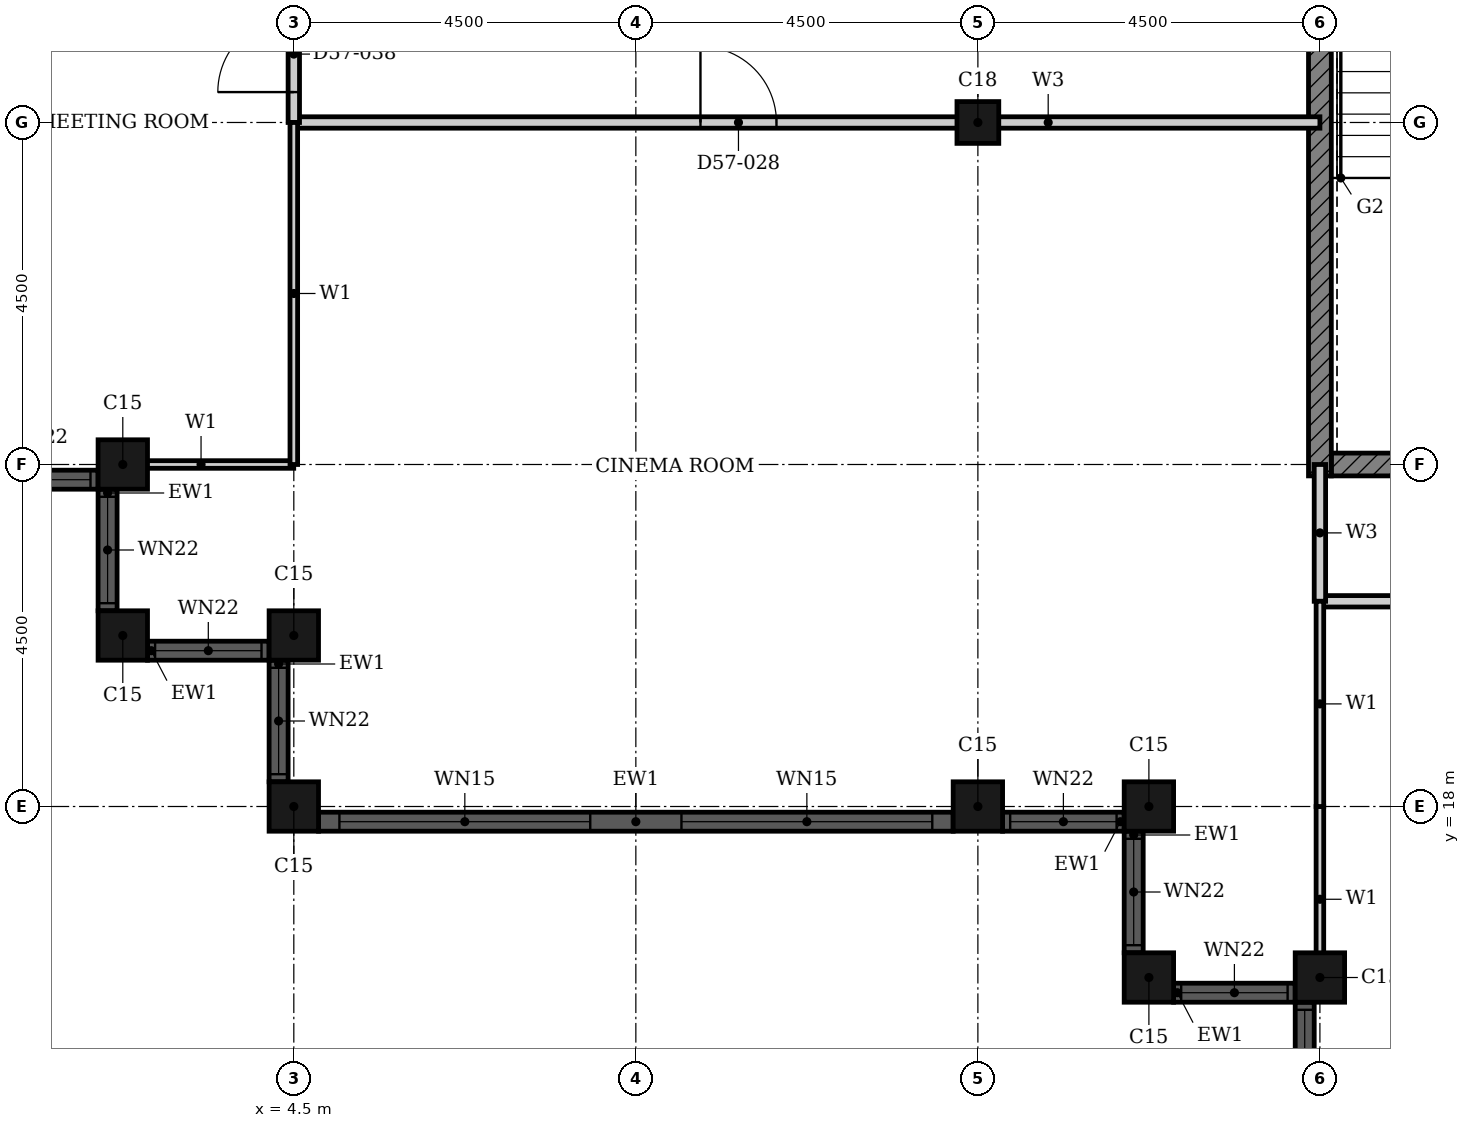
"""IFC4 building model, lengths in metres.
Left out: names, types, materials, properties, quantities, classifications, styles, units other than length and angle.
Written with IfcOpenShell. Run it as: python <this file> out.ifc"""

import sys

from ifc_helpers import new_model, si_unit, direction, frame, frame_2d, origin, origin_2d, place, context, subcontext, project, spatial, rectangle, hollow_rectangle, extrude, element, fill, save


model = new_model("IFC4")
c1 = context("Model", 3, precision=1e-05, world=origin(), true_north=direction((0.0, 1.0)))
c2 = subcontext(c1, "Body", "Model", "MODEL_VIEW")
j1 = project(units=[si_unit("LENGTHUNIT", "METRE"), si_unit("PLANEANGLEUNIT", "RADIAN")], contexts=[c1])
p1 = place(None, origin())
s1 = spatial("IfcSite", under=j1, at=p1, CompositionType="ELEMENT")
p2 = place(p1, origin())
s2 = spatial("IfcBuilding", under=s1, at=p2, CompositionType="ELEMENT")
p3 = place(p2, frame((0.0, 0.0, 225.7)))
s3 = spatial("IfcBuildingStorey", under=s2, at=p3, CompositionType="ELEMENT", Elevation=225.7)
for number, where, z_axis, x_axis in (
    (1, (2.25, 22.5, 0.0), (0.0, 0.0, 1.0), (1.0, 0.0, 0.0)),
    (2, (2.25, 20.25, 0.0), (0.0, 0.0, 1.0), (1.0, 0.0, 0.0)),
    (3, (4.5, 20.25, 0.0), (0.0, 0.0, 1.0), (1.0, 0.0, 0.0)),
    (4, (4.5, 18.0, 0.0), (0.0, 0.0, 1.0), (1.0, 0.0, 0.0)),
    (5, (13.5, 18.0, 0.0), (0.0, 0.0, 1.0), (1.0, 0.0, 0.0)),
    (6, (15.75, 18.0, 0.0), (0.0, 0.0, 1.0), (1.0, 0.0, 0.0)),
    (7, (15.75, 15.75, 0.0), (0.0, 0.0, 1.0), (1.0, 0.0, 0.0)),
    (8, (18.0, 15.75, 0.0), (0.0, 0.0, 1.0), (1.0, 0.0, 0.0)),
):
    element("IfcColumn", number, at=place(p3, frame(where, z_axis=z_axis, x_axis=x_axis)), inside=s3, PredefinedType="COLUMN", context=c2, shape_type="SweptSolid", body=[
        extrude(hollow_rectangle(XDim=0.65, YDim=0.65, WallThickness=0.021, at=origin_2d()), origin(), (0.0, 0.0, 1.0), 3.7),
    ])
p4 = place(p3, frame((13.5, 27.0, 0.0), z_axis=(0.0, 0.0, 1.0), x_axis=(1.0, 0.0, 0.0)))
e9 = element("IfcColumn", 9, at=p4, inside=s3, PredefinedType="COLUMN", context=c2, shape_type="SweptSolid", body=[
    extrude(hollow_rectangle(XDim=0.55, YDim=0.55, WallThickness=0.018, at=origin_2d()), origin(), (0.0, 0.0, 1.0), 3.7),
])
p5 = place(p3, frame((0.325, 22.3, 0.0), z_axis=(0.0, 0.0, 1.0), x_axis=(1.0, 0.0, 0.0)))
e10 = element("IfcWall", 10, at=p5, inside=s3, PredefinedType="SOLIDWALL", context=c2, shape_type="SweptSolid", body=[
    extrude(rectangle(XDim=1.6, YDim=0.25, at=frame_2d((0.8, 0.0))), origin(), (0.0, 0.0, 1.0), 3.7),
])
p6 = place(p5, frame((0.1, 0.0, 0.9)))
e11 = element("IfcOpeningElement", 11, at=p6, cuts=e10, PredefinedType="OPENING", context=c2, shape_type="SweptSolid", body=[
    extrude(rectangle(XDim=1.4, YDim=1.85, at=frame_2d((0.7, 0.925))), frame((0.0, 0.135, 0.0), z_axis=(0.0, -1.0, 0.0), x_axis=(1.0, 0.0, 0.0)), (0.0, 0.0, 1.0), 0.27),
])
p7 = place(p3, frame((2.05, 22.175, 0.0), z_axis=(0.0, 0.0, 1.0), x_axis=(0.0, -1.0, 0.0)))
e12 = element("IfcWall", 12, at=p7, inside=s3, PredefinedType="SOLIDWALL", context=c2, shape_type="SweptSolid", body=[
    extrude(rectangle(XDim=1.6, YDim=0.25, at=frame_2d((0.8, 0.0))), origin(), (0.0, 0.0, 1.0), 3.7),
])
p8 = place(p7, frame((0.1, 0.0, 0.9)))
e13 = element("IfcOpeningElement", 13, at=p8, cuts=e12, PredefinedType="OPENING", context=c2, shape_type="SweptSolid", body=[
    extrude(rectangle(XDim=1.4, YDim=1.85, at=frame_2d((0.7, 0.925))), frame((0.0, 0.135, 0.0), z_axis=(0.0, -1.0, 0.0), x_axis=(1.0, 0.0, 0.0)), (0.0, 0.0, 1.0), 0.27),
])
p9 = place(p3, frame((2.575, 20.05, 0.0), z_axis=(0.0, 0.0, 1.0), x_axis=(1.0, 0.0, 0.0)))
e14 = element("IfcWall", 14, at=p9, inside=s3, PredefinedType="SOLIDWALL", context=c2, shape_type="SweptSolid", body=[
    extrude(rectangle(XDim=1.6, YDim=0.25, at=frame_2d((0.8, 0.0))), origin(), (0.0, 0.0, 1.0), 3.7),
])
p10 = place(p9, frame((0.1, 0.0, 0.9)))
e15 = element("IfcOpeningElement", 15, at=p10, cuts=e14, PredefinedType="OPENING", context=c2, shape_type="SweptSolid", body=[
    extrude(rectangle(XDim=1.4, YDim=1.85, at=frame_2d((0.7, 0.925))), frame((0.0, 0.135, 0.0), z_axis=(0.0, -1.0, 0.0), x_axis=(1.0, 0.0, 0.0)), (0.0, 0.0, 1.0), 0.27),
])
p11 = place(p3, frame((4.3, 19.925, 0.0), z_axis=(0.0, 0.0, 1.0), x_axis=(0.0, -1.0, 0.0)))
e16 = element("IfcWall", 16, at=p11, inside=s3, PredefinedType="SOLIDWALL", context=c2, shape_type="SweptSolid", body=[
    extrude(rectangle(XDim=1.6, YDim=0.25, at=frame_2d((0.8, 0.0))), origin(), (0.0, 0.0, 1.0), 3.7),
])
p12 = place(p11, frame((0.1, 0.0, 0.9)))
e17 = element("IfcOpeningElement", 17, at=p12, cuts=e16, PredefinedType="OPENING", context=c2, shape_type="SweptSolid", body=[
    extrude(rectangle(XDim=1.4, YDim=1.85, at=frame_2d((0.7, 0.925))), frame((0.0, 0.135, 0.0), z_axis=(0.0, -1.0, 0.0), x_axis=(1.0, 0.0, 0.0)), (0.0, 0.0, 1.0), 0.27),
])
p13 = place(p3, frame((4.825, 17.8, 0.0), z_axis=(0.0, 0.0, 1.0), x_axis=(1.0, 0.0, 0.0)))
e18 = element("IfcWall", 18, at=p13, inside=s3, PredefinedType="SOLIDWALL", context=c2, shape_type="SweptSolid", body=[
    extrude(rectangle(XDim=8.35, YDim=0.25, at=frame_2d((4.175, 0.0))), origin(), (0.0, 0.0, 1.0), 3.7),
])
p14 = place(p13, frame((0.275, 0.0, 0.45)))
e19 = element("IfcOpeningElement", 19, at=p14, cuts=e18, PredefinedType="OPENING", context=c2, shape_type="SweptSolid", body=[
    extrude(rectangle(XDim=3.3, YDim=2.3, at=frame_2d((1.65, 1.15))), frame((0.0, 0.135, 0.0), z_axis=(0.0, -1.0, 0.0), x_axis=(1.0, 0.0, 0.0)), (0.0, 0.0, 1.0), 0.27),
])
p15 = place(p13, frame((4.775, 0.0, 0.45)))
e20 = element("IfcOpeningElement", 20, at=p15, cuts=e18, PredefinedType="OPENING", context=c2, shape_type="SweptSolid", body=[
    extrude(rectangle(XDim=3.3, YDim=2.3, at=frame_2d((1.65, 1.15))), frame((0.0, 0.135, 0.0), z_axis=(0.0, -1.0, 0.0), x_axis=(1.0, 0.0, 0.0)), (0.0, 0.0, 1.0), 0.27),
])
p16 = place(p3, frame((13.825, 17.8, 0.0), z_axis=(0.0, 0.0, 1.0), x_axis=(1.0, 0.0, 0.0)))
e21 = element("IfcWall", 21, at=p16, inside=s3, PredefinedType="SOLIDWALL", context=c2, shape_type="SweptSolid", body=[
    extrude(rectangle(XDim=1.6, YDim=0.25, at=frame_2d((0.8, 0.0))), origin(), (0.0, 0.0, 1.0), 3.7),
])
p17 = place(p16, frame((0.1, 0.0, 0.9)))
e22 = element("IfcOpeningElement", 22, at=p17, cuts=e21, PredefinedType="OPENING", context=c2, shape_type="SweptSolid", body=[
    extrude(rectangle(XDim=1.4, YDim=1.85, at=frame_2d((0.7, 0.925))), frame((0.0, 0.135, 0.0), z_axis=(0.0, -1.0, 0.0), x_axis=(1.0, 0.0, 0.0)), (0.0, 0.0, 1.0), 0.27),
])
p18 = place(p3, frame((15.55, 17.675, 0.0), z_axis=(0.0, 0.0, 1.0), x_axis=(0.0, -1.0, 0.0)))
e23 = element("IfcWall", 23, at=p18, inside=s3, PredefinedType="SOLIDWALL", context=c2, shape_type="SweptSolid", body=[
    extrude(rectangle(XDim=1.6, YDim=0.25, at=frame_2d((0.8, 0.0))), origin(), (0.0, 0.0, 1.0), 3.7),
])
p19 = place(p18, frame((0.1, 0.0, 0.9)))
e24 = element("IfcOpeningElement", 24, at=p19, cuts=e23, PredefinedType="OPENING", context=c2, shape_type="SweptSolid", body=[
    extrude(rectangle(XDim=1.4, YDim=1.85, at=frame_2d((0.7, 0.925))), frame((0.0, 0.135, 0.0), z_axis=(0.0, -1.0, 0.0), x_axis=(1.0, 0.0, 0.0)), (0.0, 0.0, 1.0), 0.27),
])
p20 = place(p3, frame((16.075, 15.55, 0.0), z_axis=(0.0, 0.0, 1.0), x_axis=(1.0, 0.0, 0.0)))
e25 = element("IfcWall", 25, at=p20, inside=s3, PredefinedType="SOLIDWALL", context=c2, shape_type="SweptSolid", body=[
    extrude(rectangle(XDim=1.6, YDim=0.25, at=frame_2d((0.8, 0.0))), origin(), (0.0, 0.0, 1.0), 3.7),
])
p21 = place(p20, frame((0.1, 0.0, 0.9)))
e26 = element("IfcOpeningElement", 26, at=p21, cuts=e25, PredefinedType="OPENING", context=c2, shape_type="SweptSolid", body=[
    extrude(rectangle(XDim=1.4, YDim=1.85, at=frame_2d((0.7, 0.925))), frame((0.0, 0.135, 0.0), z_axis=(0.0, -1.0, 0.0), x_axis=(1.0, 0.0, 0.0)), (0.0, 0.0, 1.0), 0.27),
])
p22 = place(p3, frame((17.8, 15.425, 0.0), z_axis=(0.0, 0.0, 1.0), x_axis=(0.0, -1.0, 0.0)))
e27 = element("IfcWall", 27, at=p22, inside=s3, PredefinedType="SOLIDWALL", context=c2, shape_type="SweptSolid", body=[
    extrude(rectangle(XDim=1.6, YDim=0.25, at=frame_2d((0.8, 0.0))), origin(), (0.0, 0.0, 1.0), 3.7),
])
p23 = place(p22, frame((0.1, 0.0, 0.9)))
e28 = element("IfcOpeningElement", 28, at=p23, cuts=e27, PredefinedType="OPENING", context=c2, shape_type="SweptSolid", body=[
    extrude(rectangle(XDim=1.4, YDim=1.85, at=frame_2d((0.7, 0.925))), frame((0.0, 0.135, 0.0), z_axis=(0.0, -1.0, 0.0), x_axis=(1.0, 0.0, 0.0)), (0.0, 0.0, 1.0), 0.27),
])
p24 = place(p3, frame((18.15, 22.5, 0.0), z_axis=(0.0, 0.0, 1.0), x_axis=(1.0, 0.0, 0.0)))
e29 = element("IfcWall", 29, at=p24, inside=s3, PredefinedType="SHEAR", context=c2, shape_type="SweptSolid", body=[
    extrude(rectangle(XDim=4.225, YDim=0.3, at=frame_2d((2.113, 0.0))), origin(), (0.0, 0.0, 1.0), 3.4),
])
p25 = place(p3, frame((18.0, 22.35, 0.0), z_axis=(0.0, 0.0, 1.0), x_axis=(0.0, 1.0, 0.0)))
e30 = element("IfcWall", 30, at=p25, inside=s3, PredefinedType="SHEAR", context=c2, shape_type="SweptSolid", body=[
    extrude(rectangle(XDim=9.3, YDim=0.3, at=frame_2d((4.65, 0.0))), origin(), (0.0, 0.0, 1.0), 3.4),
])
p26 = place(p3, frame((18.0, 20.7, 0.0), z_axis=(0.0, 0.0, 1.0), x_axis=(1.0, 0.0, 0.0)))
e31 = element("IfcWall", 31, at=p26, inside=s3, PredefinedType="PARTITIONING", context=c2, shape_type="SweptSolid", body=[
    extrude(rectangle(XDim=13.5, YDim=0.15, at=frame_2d((6.75, 0.0))), origin(), (0.0, 0.0, 1.0), 3.4),
])
p27 = place(p26, frame((6.25, 0.0, 0.0)))
e32 = element("IfcOpeningElement", 32, at=p27, cuts=e31, PredefinedType="OPENING", context=c2, shape_type="SweptSolid", body=[
    extrude(rectangle(XDim=1.0, YDim=2.1, at=frame_2d((0.5, 1.05))), frame((0.0, 0.085, 0.0), z_axis=(0.0, -1.0, 0.0), x_axis=(1.0, 0.0, 0.0)), (0.0, 0.0, 1.0), 0.17),
])
p28 = place(p3, frame((4.5, 27.0, 0.0), z_axis=(0.0, 0.0, 1.0), x_axis=(1.0, 0.0, 0.0)))
e33 = element("IfcWall", 33, at=p28, inside=s3, PredefinedType="PARTITIONING", context=c2, shape_type="SweptSolid", body=[
    extrude(rectangle(XDim=13.5, YDim=0.15, at=frame_2d((6.75, 0.0))), origin(), (0.0, 0.0, 1.0), 2.68),
])
p29 = place(p28, frame((5.35, 0.0, 0.0)))
e34 = element("IfcOpeningElement", 34, at=p29, cuts=e33, PredefinedType="OPENING", context=c2, shape_type="SweptSolid", body=[
    extrude(rectangle(XDim=1.0, YDim=2.1, at=frame_2d((0.5, 1.05))), frame((0.0, 0.085, 0.0), z_axis=(0.0, -1.0, 0.0), x_axis=(1.0, 0.0, 0.0)), (0.0, 0.0, 1.0), 0.17),
])
p30 = place(p3, frame((18.0, 20.7, 0.0), z_axis=(0.0, 0.0, 1.0), x_axis=(0.0, 1.0, 0.0)))
e35 = element("IfcWall", 35, at=p30, inside=s3, PredefinedType="PARTITIONING", context=c2, shape_type="SweptSolid", body=[
    extrude(rectangle(XDim=1.8, YDim=0.15, at=frame_2d((0.9, 0.0))), origin(), (0.0, 0.0, 1.0), 3.4),
])
p31 = place(p3, frame((4.5, 27.0, 0.0), z_axis=(0.0, 0.0, 1.0), x_axis=(0.0, 1.0, 0.0)))
e36 = element("IfcWall", 36, at=p31, inside=s3, PredefinedType="PARTITIONING", context=c2, shape_type="SweptSolid", body=[
    extrude(rectangle(XDim=1.8, YDim=0.15, at=frame_2d((0.9, 0.0))), origin(), (0.0, 0.0, 1.0), 3.4),
])
p32 = place(p31, frame((0.4, 0.0, 0.0)))
e37 = element("IfcOpeningElement", 37, at=p32, cuts=e36, PredefinedType="OPENING", context=c2, shape_type="SweptSolid", body=[
    extrude(rectangle(XDim=1.0, YDim=2.1, at=frame_2d((0.5, 1.05))), frame((0.0, 0.085, 0.0), z_axis=(0.0, -1.0, 0.0), x_axis=(1.0, 0.0, 0.0)), (0.0, 0.0, 1.0), 0.17),
])
p33 = place(p3, frame((2.06, 22.5, 0.0), z_axis=(0.0, 0.0, 1.0), x_axis=(1.0, 0.0, 0.0)))
e38 = element("IfcWall", 38, at=p33, inside=s3, PredefinedType="PARTITIONING", context=c2, shape_type="SweptSolid", body=[
    extrude(rectangle(XDim=2.439, YDim=0.1, at=frame_2d((1.219, 0.0))), origin(), (0.0, 0.0, 1.0), 2.68),
])
p34 = place(p3, frame((18.0, 15.56, 0.0), z_axis=(0.0, 0.0, 1.0), x_axis=(0.0, 1.0, 0.0)))
e39 = element("IfcWall", 39, at=p34, inside=s3, PredefinedType="PARTITIONING", context=c2, shape_type="SweptSolid", body=[
    extrude(rectangle(XDim=2.439, YDim=0.1, at=frame_2d((1.219, 0.0))), origin(), (0.0, 0.0, 1.0), 3.4),
])
p35 = place(p3, frame((18.0, 18.0, 0.0), z_axis=(0.0, 0.0, 1.0), x_axis=(0.0, 1.0, 0.0)))
e40 = element("IfcWall", 40, at=p35, inside=s3, PredefinedType="PARTITIONING", context=c2, shape_type="SweptSolid", body=[
    extrude(rectangle(XDim=2.7, YDim=0.1, at=frame_2d((1.35, 0.0))), origin(), (0.0, 0.0, 1.0), 3.4),
])
p36 = place(p3, frame((4.5, 22.5, 0.0), z_axis=(0.0, 0.0, 1.0), x_axis=(0.0, 1.0, 0.0)))
e41 = element("IfcWall", 41, at=p36, inside=s3, PredefinedType="PARTITIONING", context=c2, shape_type="SweptSolid", body=[
    extrude(rectangle(XDim=4.5, YDim=0.1, at=frame_2d((2.25, 0.0))), origin(), (0.0, 0.0, 1.0), 3.4),
])
p37 = place(p6, origin())
e42 = element("IfcWindow", 42, at=p37, inside=s3, PartitioningType="SINGLE_PANEL", PredefinedType="WINDOW", context=c2, shape_type="SweptSolid", body=[
    extrude(rectangle(XDim=1.4, YDim=1.85, at=frame_2d((0.7, 0.925))), frame((0.0, 0.03, 0.0), z_axis=(0.0, -1.0, 0.0), x_axis=(1.0, 0.0, 0.0)), (0.0, 0.0, 1.0), 0.06),
])
fill(e11, e42)
p38 = place(p8, origin())
e43 = element("IfcWindow", 43, at=p38, inside=s3, PartitioningType="SINGLE_PANEL", PredefinedType="WINDOW", context=c2, shape_type="SweptSolid", body=[
    extrude(rectangle(XDim=1.4, YDim=1.85, at=frame_2d((0.7, 0.925))), frame((0.0, 0.03, 0.0), z_axis=(0.0, -1.0, 0.0), x_axis=(1.0, 0.0, 0.0)), (0.0, 0.0, 1.0), 0.06),
])
fill(e13, e43)
p39 = place(p10, origin())
e44 = element("IfcWindow", 44, at=p39, inside=s3, PartitioningType="SINGLE_PANEL", PredefinedType="WINDOW", context=c2, shape_type="SweptSolid", body=[
    extrude(rectangle(XDim=1.4, YDim=1.85, at=frame_2d((0.7, 0.925))), frame((0.0, 0.03, 0.0), z_axis=(0.0, -1.0, 0.0), x_axis=(1.0, 0.0, 0.0)), (0.0, 0.0, 1.0), 0.06),
])
fill(e15, e44)
p40 = place(p12, origin())
e45 = element("IfcWindow", 45, at=p40, inside=s3, PartitioningType="SINGLE_PANEL", PredefinedType="WINDOW", context=c2, shape_type="SweptSolid", body=[
    extrude(rectangle(XDim=1.4, YDim=1.85, at=frame_2d((0.7, 0.925))), frame((0.0, 0.03, 0.0), z_axis=(0.0, -1.0, 0.0), x_axis=(1.0, 0.0, 0.0)), (0.0, 0.0, 1.0), 0.06),
])
fill(e17, e45)
p41 = place(p14, origin())
e46 = element("IfcWindow", 46, at=p41, inside=s3, PartitioningType="SINGLE_PANEL", PredefinedType="WINDOW", context=c2, shape_type="SweptSolid", body=[
    extrude(rectangle(XDim=3.3, YDim=2.3, at=frame_2d((1.65, 1.15))), frame((0.0, 0.03, 0.0), z_axis=(0.0, -1.0, 0.0), x_axis=(1.0, 0.0, 0.0)), (0.0, 0.0, 1.0), 0.06),
])
fill(e19, e46)
p42 = place(p15, origin())
e47 = element("IfcWindow", 47, at=p42, inside=s3, PartitioningType="SINGLE_PANEL", PredefinedType="WINDOW", context=c2, shape_type="SweptSolid", body=[
    extrude(rectangle(XDim=3.3, YDim=2.3, at=frame_2d((1.65, 1.15))), frame((0.0, 0.03, 0.0), z_axis=(0.0, -1.0, 0.0), x_axis=(1.0, 0.0, 0.0)), (0.0, 0.0, 1.0), 0.06),
])
fill(e20, e47)
p43 = place(p17, origin())
e48 = element("IfcWindow", 48, at=p43, inside=s3, PartitioningType="SINGLE_PANEL", PredefinedType="WINDOW", context=c2, shape_type="SweptSolid", body=[
    extrude(rectangle(XDim=1.4, YDim=1.85, at=frame_2d((0.7, 0.925))), frame((0.0, 0.03, 0.0), z_axis=(0.0, -1.0, 0.0), x_axis=(1.0, 0.0, 0.0)), (0.0, 0.0, 1.0), 0.06),
])
fill(e22, e48)
p44 = place(p19, origin())
e49 = element("IfcWindow", 49, at=p44, inside=s3, PartitioningType="SINGLE_PANEL", PredefinedType="WINDOW", context=c2, shape_type="SweptSolid", body=[
    extrude(rectangle(XDim=1.4, YDim=1.85, at=frame_2d((0.7, 0.925))), frame((0.0, 0.03, 0.0), z_axis=(0.0, -1.0, 0.0), x_axis=(1.0, 0.0, 0.0)), (0.0, 0.0, 1.0), 0.06),
])
fill(e24, e49)
p45 = place(p21, origin())
e50 = element("IfcWindow", 50, at=p45, inside=s3, PartitioningType="SINGLE_PANEL", PredefinedType="WINDOW", context=c2, shape_type="SweptSolid", body=[
    extrude(rectangle(XDim=1.4, YDim=1.85, at=frame_2d((0.7, 0.925))), frame((0.0, 0.03, 0.0), z_axis=(0.0, -1.0, 0.0), x_axis=(1.0, 0.0, 0.0)), (0.0, 0.0, 1.0), 0.06),
])
fill(e26, e50)
p46 = place(p23, origin())
e51 = element("IfcWindow", 51, at=p46, inside=s3, PartitioningType="SINGLE_PANEL", PredefinedType="WINDOW", context=c2, shape_type="SweptSolid", body=[
    extrude(rectangle(XDim=1.4, YDim=1.85, at=frame_2d((0.7, 0.925))), frame((0.0, 0.03, 0.0), z_axis=(0.0, -1.0, 0.0), x_axis=(1.0, 0.0, 0.0)), (0.0, 0.0, 1.0), 0.06),
])
fill(e28, e51)
p47 = place(p29, origin())
e52 = element("IfcDoor", 52, at=p47, inside=s3, OperationType="SINGLE_SWING_LEFT", PredefinedType="DOOR", context=c2, shape_type="SweptSolid", body=[
    extrude(rectangle(XDim=1.0, YDim=2.1, at=frame_2d((0.5, 1.05))), frame((0.0, 0.025, 0.0), z_axis=(0.0, -1.0, 0.0), x_axis=(1.0, 0.0, 0.0)), (0.0, 0.0, 1.0), 0.05),
])
fill(e34, e52)
p48 = place(p32, origin())
e53 = element("IfcDoor", 53, at=p48, inside=s3, OperationType="SINGLE_SWING_RIGHT", PredefinedType="DOOR", context=c2, shape_type="SweptSolid", body=[
    extrude(rectangle(XDim=1.0, YDim=2.1, at=frame_2d((0.5, 1.05))), frame((0.0, 0.025, 0.0), z_axis=(0.0, -1.0, 0.0), x_axis=(1.0, 0.0, 0.0)), (0.0, 0.0, 1.0), 0.05),
])
fill(e37, e53)
save(model, sys.argv[1])
